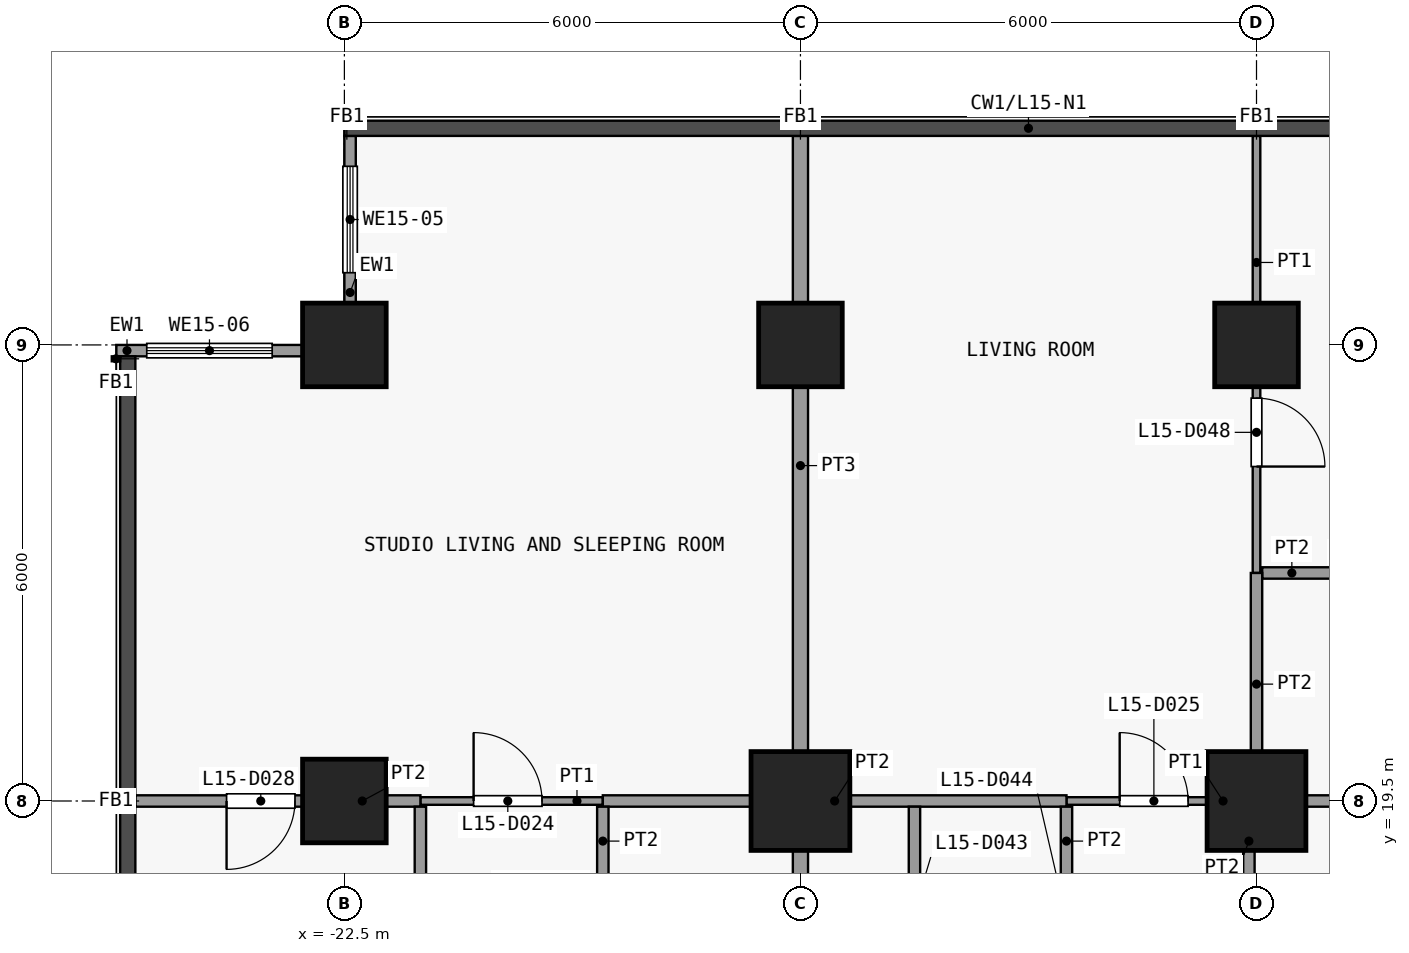
"""IFC4 building model, lengths in metres.
Left out: names, types, materials, properties, quantities, classifications, styles, units other than length and angle.
Written with IfcOpenShell. Run it as: python <this file> out.ifc"""

import sys

from ifc_helpers import new_model, si_unit, direction, frame, frame_2d, origin, origin_2d, place, context, subcontext, project, spatial, rectangle, extrude, element, fill, save


model = new_model("IFC4")
c1 = context("Model", 3, precision=1e-05, world=origin(), true_north=direction((0.0, 1.0)))
c2 = subcontext(c1, "Body", "Model", "MODEL_VIEW")
j1 = project(units=[si_unit("LENGTHUNIT", "METRE"), si_unit("PLANEANGLEUNIT", "RADIAN")], contexts=[c1])
p1 = place(None, origin())
s1 = spatial("IfcSite", under=j1, at=p1, CompositionType="ELEMENT")
p2 = place(p1, origin())
s2 = spatial("IfcBuilding", under=s1, at=p2, CompositionType="ELEMENT")
p3 = place(p2, frame((0.0, 0.0, 64.9)))
s3 = spatial("IfcBuildingStorey", under=s2, at=p3, CompositionType="ELEMENT", Elevation=64.9)
for number, where, z_axis, x_axis in (
    (1, (-22.5, 19.5, 0.0), (0.0, 0.0, 1.0), (1.0, 0.0, 0.0)),
    (2, (-22.5, 25.5, 0.0), (0.0, 0.0, 1.0), (1.0, 0.0, 0.0)),
):
    element("IfcColumn", number, at=place(p3, frame(where, z_axis=z_axis, x_axis=x_axis)), inside=s3, PredefinedType="COLUMN", context=c2, shape_type="SweptSolid", body=[
        extrude(rectangle(XDim=1.1, YDim=1.1, at=origin_2d()), origin(), (0.0, 0.0, 1.0), 3.6),
    ])
p4 = place(p3, frame((-16.5, 19.5, 0.0), z_axis=(0.0, 0.0, 1.0), x_axis=(1.0, 0.0, 0.0)))
e3 = element("IfcColumn", 3, at=p4, inside=s3, PredefinedType="COLUMN", context=c2, shape_type="SweptSolid", body=[
    extrude(rectangle(XDim=1.3, YDim=1.3, at=origin_2d()), origin(), (0.0, 0.0, 1.0), 3.6),
])
p5 = place(p3, frame((-16.5, 25.5, 0.0), z_axis=(0.0, 0.0, 1.0), x_axis=(1.0, 0.0, 0.0)))
e4 = element("IfcColumn", 4, at=p5, inside=s3, PredefinedType="COLUMN", context=c2, shape_type="SweptSolid", body=[
    extrude(rectangle(XDim=1.1, YDim=1.1, at=origin_2d()), origin(), (0.0, 0.0, 1.0), 3.6),
])
p6 = place(p3, frame((-10.5, 19.5, 0.0), z_axis=(0.0, 0.0, 1.0), x_axis=(1.0, 0.0, 0.0)))
e5 = element("IfcColumn", 5, at=p6, inside=s3, PredefinedType="COLUMN", context=c2, shape_type="SweptSolid", body=[
    extrude(rectangle(XDim=1.3, YDim=1.3, at=origin_2d()), origin(), (0.0, 0.0, 1.0), 3.6),
])
p7 = place(p3, frame((-10.5, 25.5, 0.0), z_axis=(0.0, 0.0, 1.0), x_axis=(1.0, 0.0, 0.0)))
e6 = element("IfcColumn", 6, at=p7, inside=s3, PredefinedType="COLUMN", context=c2, shape_type="SweptSolid", body=[
    extrude(rectangle(XDim=1.1, YDim=1.1, at=origin_2d()), origin(), (0.0, 0.0, 1.0), 3.6),
])
p8 = place(p3, frame((-22.425, 26.05, 0.0), z_axis=(0.0, 0.0, 1.0), x_axis=(0.0, 1.0, 0.0)))
e7 = element("IfcWall", 7, at=p8, inside=s3, PredefinedType="SOLIDWALL", context=c2, shape_type="SweptSolid", body=[
    extrude(rectangle(XDim=2.2, YDim=0.15, at=frame_2d((1.1, 0.0))), origin(), (0.0, 0.0, 1.0), 3.3),
])
p9 = place(p8, frame((0.4, 0.0, 0.9)))
e8 = element("IfcOpeningElement", 8, at=p9, cuts=e7, PredefinedType="OPENING", context=c2, shape_type="SweptSolid", body=[
    extrude(rectangle(XDim=1.4, YDim=2.4, at=frame_2d((0.7, 1.2))), frame((0.0, 0.085, 0.0), z_axis=(0.0, -1.0, 0.0), x_axis=(1.0, 0.0, 0.0)), (0.0, 0.0, 1.0), 0.17),
])
p10 = place(p3, frame((-25.5, 25.425, 0.0), z_axis=(0.0, 0.0, 1.0), x_axis=(1.0, 0.0, 0.0)))
e9 = element("IfcWall", 9, at=p10, inside=s3, PredefinedType="SOLIDWALL", context=c2, shape_type="SweptSolid", body=[
    extrude(rectangle(XDim=2.45, YDim=0.15, at=frame_2d((1.225, 0.0))), origin(), (0.0, 0.0, 1.0), 3.3),
])
p11 = place(p10, frame((0.4, 0.0, 0.9)))
e10 = element("IfcOpeningElement", 10, at=p11, cuts=e9, PredefinedType="OPENING", context=c2, shape_type="SweptSolid", body=[
    extrude(rectangle(XDim=1.65, YDim=2.4, at=frame_2d((0.825, 1.2))), frame((0.0, 0.085, 0.0), z_axis=(0.0, -1.0, 0.0), x_axis=(1.0, 0.0, 0.0)), (0.0, 0.0, 1.0), 0.17),
])
p12 = place(p3, frame((-21.5, 19.5, 0.0), z_axis=(0.0, 0.0, 1.0), x_axis=(1.0, 0.0, 0.0)))
e11 = element("IfcWall", 11, at=p12, inside=s3, PredefinedType="PARTITIONING", context=c2, shape_type="SweptSolid", body=[
    extrude(rectangle(XDim=2.4, YDim=0.1, at=frame_2d((1.2, 0.0))), origin(), (0.0, 0.0, 1.0), 3.3),
])
p13 = place(p12, frame((0.7, 0.0, 0.0)))
e12 = element("IfcOpeningElement", 12, at=p13, cuts=e11, PredefinedType="OPENING", context=c2, shape_type="SweptSolid", body=[
    extrude(rectangle(XDim=0.9, YDim=2.1, at=frame_2d((0.45, 1.05))), frame((0.0, 0.06, 0.0), z_axis=(0.0, -1.0, 0.0), x_axis=(1.0, 0.0, 0.0)), (0.0, 0.0, 1.0), 0.12),
])
p14 = place(p3, frame((-13.0, 19.5, 0.0), z_axis=(0.0, 0.0, 1.0), x_axis=(1.0, 0.0, 0.0)))
e13 = element("IfcWall", 13, at=p14, inside=s3, PredefinedType="PARTITIONING", context=c2, shape_type="SweptSolid", body=[
    extrude(rectangle(XDim=2.4, YDim=0.1, at=frame_2d((1.2, 0.0))), origin(), (0.0, 0.0, 1.0), 3.3),
])
p15 = place(p14, frame((0.7, 0.0, 0.0)))
e14 = element("IfcOpeningElement", 14, at=p15, cuts=e13, PredefinedType="OPENING", context=c2, shape_type="SweptSolid", body=[
    extrude(rectangle(XDim=0.9, YDim=2.1, at=frame_2d((0.45, 1.05))), frame((0.0, 0.06, 0.0), z_axis=(0.0, -1.0, 0.0), x_axis=(1.0, 0.0, 0.0)), (0.0, 0.0, 1.0), 0.12),
])
p16 = place(p3, frame((-25.25, 19.5, 0.0), z_axis=(0.0, 0.0, 1.0), x_axis=(1.0, 0.0, 0.0)))
e15 = element("IfcWall", 15, at=p16, inside=s3, PredefinedType="PARTITIONING", context=c2, shape_type="SweptSolid", body=[
    extrude(rectangle(XDim=3.75, YDim=0.15, at=frame_2d((1.875, 0.0))), origin(), (0.0, 0.0, 1.0), 3.3),
])
p17 = place(p16, frame((1.2, 0.0, 0.0)))
e16 = element("IfcOpeningElement", 16, at=p17, cuts=e15, PredefinedType="OPENING", context=c2, shape_type="SweptSolid", body=[
    extrude(rectangle(XDim=0.9, YDim=2.1, at=frame_2d((0.45, 1.05))), frame((0.0, 0.085, 0.0), z_axis=(0.0, -1.0, 0.0), x_axis=(1.0, 0.0, 0.0)), (0.0, 0.0, 1.0), 0.17),
])
p18 = place(p3, frame((-19.1, 19.5, 0.0), z_axis=(0.0, 0.0, 1.0), x_axis=(1.0, 0.0, 0.0)))
e17 = element("IfcWall", 17, at=p18, inside=s3, PredefinedType="PARTITIONING", context=c2, shape_type="SweptSolid", body=[
    extrude(rectangle(XDim=6.1, YDim=0.15, at=frame_2d((3.05, 0.0))), origin(), (0.0, 0.0, 1.0), 3.3),
])
p19 = place(p3, frame((-10.5, 19.5, 0.0), z_axis=(0.0, 0.0, 1.0), x_axis=(1.0, 0.0, 0.0)))
e18 = element("IfcWall", 18, at=p19, inside=s3, PredefinedType="PARTITIONING", context=c2, shape_type="SweptSolid", body=[
    extrude(rectangle(XDim=8.5, YDim=0.15, at=frame_2d((4.25, 0.0))), origin(), (0.0, 0.0, 1.0), 3.3),
])
p20 = place(p3, frame((-10.425, 22.5, 0.0), z_axis=(0.0, 0.0, 1.0), x_axis=(1.0, 0.0, 0.0)))
e19 = element("IfcWall", 19, at=p20, inside=s3, PredefinedType="PARTITIONING", context=c2, shape_type="SweptSolid", body=[
    extrude(rectangle(XDim=2.625, YDim=0.15, at=frame_2d((1.312, 0.0))), origin(), (0.0, 0.0, 1.0), 3.3),
])
p21 = place(p20, frame((0.9, 0.0, 0.0)))
e20 = element("IfcOpeningElement", 20, at=p21, cuts=e19, PredefinedType="OPENING", context=c2, shape_type="SweptSolid", body=[
    extrude(rectangle(XDim=0.9, YDim=2.1, at=frame_2d((0.45, 1.05))), frame((0.0, 0.085, 0.0), z_axis=(0.0, -1.0, 0.0), x_axis=(1.0, 0.0, 0.0)), (0.0, 0.0, 1.0), 0.17),
])
p22 = place(p3, frame((-21.5, 16.6, 0.0), z_axis=(0.0, 0.0, 1.0), x_axis=(0.0, 1.0, 0.0)))
e21 = element("IfcWall", 21, at=p22, inside=s3, PredefinedType="PARTITIONING", context=c2, shape_type="SweptSolid", body=[
    extrude(rectangle(XDim=2.825, YDim=0.15, at=frame_2d((1.413, 0.0))), origin(), (0.0, 0.0, 1.0), 3.3),
])
p23 = place(p3, frame((-19.1, 16.6, 0.0), z_axis=(0.0, 0.0, 1.0), x_axis=(0.0, 1.0, 0.0)))
e22 = element("IfcWall", 22, at=p23, inside=s3, PredefinedType="PARTITIONING", context=c2, shape_type="SweptSolid", body=[
    extrude(rectangle(XDim=2.825, YDim=0.15, at=frame_2d((1.413, 0.0))), origin(), (0.0, 0.0, 1.0), 3.3),
])
p24 = place(p23, frame((0.9, 0.0, 0.0)))
e23 = element("IfcOpeningElement", 23, at=p24, cuts=e22, PredefinedType="OPENING", context=c2, shape_type="SweptSolid", body=[
    extrude(rectangle(XDim=0.9, YDim=2.1, at=frame_2d((0.45, 1.05))), frame((0.0, 0.085, 0.0), z_axis=(0.0, -1.0, 0.0), x_axis=(1.0, 0.0, 0.0)), (0.0, 0.0, 1.0), 0.17),
])
p25 = place(p3, frame((-16.5, 16.6, 0.0), z_axis=(0.0, 0.0, 1.0), x_axis=(0.0, 1.0, 0.0)))
e24 = element("IfcWall", 24, at=p25, inside=s3, PredefinedType="PARTITIONING", context=c2, shape_type="SweptSolid", body=[
    extrude(rectangle(XDim=2.825, YDim=0.2, at=frame_2d((1.413, 0.0))), origin(), (0.0, 0.0, 1.0), 3.3),
])
p26 = place(p3, frame((-16.5, 19.575, 0.0), z_axis=(0.0, 0.0, 1.0), x_axis=(0.0, 1.0, 0.0)))
e25 = element("IfcWall", 25, at=p26, inside=s3, PredefinedType="PARTITIONING", context=c2, shape_type="SweptSolid", body=[
    extrude(rectangle(XDim=8.675, YDim=0.2, at=frame_2d((4.337, 0.0))), origin(), (0.0, 0.0, 1.0), 3.3),
])
p27 = place(p3, frame((-15.0, 16.6, 0.0), z_axis=(0.0, 0.0, 1.0), x_axis=(0.0, 1.0, 0.0)))
e26 = element("IfcWall", 26, at=p27, inside=s3, PredefinedType="PARTITIONING", context=c2, shape_type="SweptSolid", body=[
    extrude(rectangle(XDim=2.825, YDim=0.15, at=frame_2d((1.413, 0.0))), origin(), (0.0, 0.0, 1.0), 3.3),
])
p28 = place(p27, frame((1.0, 0.0, 0.0)))
e27 = element("IfcOpeningElement", 27, at=p28, cuts=e26, PredefinedType="OPENING", context=c2, shape_type="SweptSolid", body=[
    extrude(rectangle(XDim=0.9, YDim=2.1, at=frame_2d((0.45, 1.05))), frame((0.0, 0.085, 0.0), z_axis=(0.0, -1.0, 0.0), x_axis=(1.0, 0.0, 0.0)), (0.0, 0.0, 1.0), 0.17),
])
p29 = place(p3, frame((-13.0, 16.6, 0.0), z_axis=(0.0, 0.0, 1.0), x_axis=(0.0, 1.0, 0.0)))
e28 = element("IfcWall", 28, at=p29, inside=s3, PredefinedType="PARTITIONING", context=c2, shape_type="SweptSolid", body=[
    extrude(rectangle(XDim=2.825, YDim=0.15, at=frame_2d((1.413, 0.0))), origin(), (0.0, 0.0, 1.0), 3.3),
])
p30 = place(p29, frame((0.9, 0.0, 0.0)))
e29 = element("IfcOpeningElement", 29, at=p30, cuts=e28, PredefinedType="OPENING", context=c2, shape_type="SweptSolid", body=[
    extrude(rectangle(XDim=0.9, YDim=2.1, at=frame_2d((0.45, 1.05))), frame((0.0, 0.085, 0.0), z_axis=(0.0, -1.0, 0.0), x_axis=(1.0, 0.0, 0.0)), (0.0, 0.0, 1.0), 0.17),
])
p31 = place(p3, frame((-10.6, 16.6, 0.0), z_axis=(0.0, 0.0, 1.0), x_axis=(0.0, 1.0, 0.0)))
e30 = element("IfcWall", 30, at=p31, inside=s3, PredefinedType="PARTITIONING", context=c2, shape_type="SweptSolid", body=[
    extrude(rectangle(XDim=2.825, YDim=0.15, at=frame_2d((1.413, 0.0))), origin(), (0.0, 0.0, 1.0), 3.3),
])
p32 = place(p31, frame((0.9, 0.0, 0.0)))
e31 = element("IfcOpeningElement", 31, at=p32, cuts=e30, PredefinedType="OPENING", context=c2, shape_type="SweptSolid", body=[
    extrude(rectangle(XDim=0.9, YDim=2.1, at=frame_2d((0.45, 1.05))), frame((0.0, 0.085, 0.0), z_axis=(0.0, -1.0, 0.0), x_axis=(1.0, 0.0, 0.0)), (0.0, 0.0, 1.0), 0.17),
])
p33 = place(p3, frame((-10.5, 22.5, 0.0), z_axis=(0.0, 0.0, 1.0), x_axis=(0.0, 1.0, 0.0)))
e32 = element("IfcWall", 32, at=p33, inside=s3, PredefinedType="PARTITIONING", context=c2, shape_type="SweptSolid", body=[
    extrude(rectangle(XDim=5.75, YDim=0.1, at=frame_2d((2.875, 0.0))), origin(), (0.0, 0.0, 1.0), 3.3),
])
p34 = place(p33, frame((1.4, 0.0, 0.0)))
e33 = element("IfcOpeningElement", 33, at=p34, cuts=e32, PredefinedType="OPENING", context=c2, shape_type="SweptSolid", body=[
    extrude(rectangle(XDim=0.9, YDim=2.1, at=frame_2d((0.45, 1.05))), frame((0.0, 0.06, 0.0), z_axis=(0.0, -1.0, 0.0), x_axis=(1.0, 0.0, 0.0)), (0.0, 0.0, 1.0), 0.12),
])
p35 = place(p3, frame((-10.5, 19.575, 0.0), z_axis=(0.0, 0.0, 1.0), x_axis=(0.0, 1.0, 0.0)))
e34 = element("IfcWall", 34, at=p35, inside=s3, PredefinedType="PARTITIONING", context=c2, shape_type="SweptSolid", body=[
    extrude(rectangle(XDim=2.925, YDim=0.15, at=frame_2d((1.462, 0.0))), origin(), (0.0, 0.0, 1.0), 3.3),
])
p36 = place(p9, origin())
e35 = element("IfcWindow", 35, at=p36, inside=s3, PartitioningType="SINGLE_PANEL", PredefinedType="WINDOW", context=c2, shape_type="SweptSolid", body=[
    extrude(rectangle(XDim=1.4, YDim=2.4, at=frame_2d((0.7, 1.2))), frame((0.0, 0.03, 0.0), z_axis=(0.0, -1.0, 0.0), x_axis=(1.0, 0.0, 0.0)), (0.0, 0.0, 1.0), 0.06),
])
fill(e8, e35)
p37 = place(p11, origin())
e36 = element("IfcWindow", 36, at=p37, inside=s3, PartitioningType="SINGLE_PANEL", PredefinedType="WINDOW", context=c2, shape_type="SweptSolid", body=[
    extrude(rectangle(XDim=1.65, YDim=2.4, at=frame_2d((0.825, 1.2))), frame((0.0, 0.03, 0.0), z_axis=(0.0, -1.0, 0.0), x_axis=(1.0, 0.0, 0.0)), (0.0, 0.0, 1.0), 0.06),
])
fill(e10, e36)
p38 = place(p13, origin())
e37 = element("IfcDoor", 37, at=p38, inside=s3, OperationType="SINGLE_SWING_RIGHT", PredefinedType="DOOR", context=c2, shape_type="SweptSolid", body=[
    extrude(rectangle(XDim=0.9, YDim=2.1, at=frame_2d((0.45, 1.05))), frame((0.0, 0.025, 0.0), z_axis=(0.0, -1.0, 0.0), x_axis=(1.0, 0.0, 0.0)), (0.0, 0.0, 1.0), 0.05),
])
fill(e12, e37)
p39 = place(p15, origin())
e38 = element("IfcDoor", 38, at=p39, inside=s3, OperationType="SINGLE_SWING_RIGHT", PredefinedType="DOOR", context=c2, shape_type="SweptSolid", body=[
    extrude(rectangle(XDim=0.9, YDim=2.1, at=frame_2d((0.45, 1.05))), frame((0.0, 0.025, 0.0), z_axis=(0.0, -1.0, 0.0), x_axis=(1.0, 0.0, 0.0)), (0.0, 0.0, 1.0), 0.05),
])
fill(e14, e38)
p40 = place(p17, origin())
e39 = element("IfcDoor", 39, at=p40, inside=s3, OperationType="SINGLE_SWING_LEFT", PredefinedType="DOOR", context=c2, shape_type="SweptSolid", body=[
    extrude(rectangle(XDim=0.9, YDim=2.1, at=frame_2d((0.45, 1.05))), frame((0.0, 0.025, 0.0), z_axis=(0.0, -1.0, 0.0), x_axis=(1.0, 0.0, 0.0)), (0.0, 0.0, 1.0), 0.05),
])
fill(e16, e39)
p41 = place(p34, origin())
e40 = element("IfcDoor", 40, at=p41, inside=s3, OperationType="SINGLE_SWING_LEFT", PredefinedType="DOOR", context=c2, shape_type="SweptSolid", body=[
    extrude(rectangle(XDim=0.9, YDim=2.1, at=frame_2d((0.45, 1.05))), frame((0.0, 0.025, 0.0), z_axis=(0.0, -1.0, 0.0), x_axis=(1.0, 0.0, 0.0)), (0.0, 0.0, 1.0), 0.05),
])
fill(e33, e40)
save(model, sys.argv[1])
